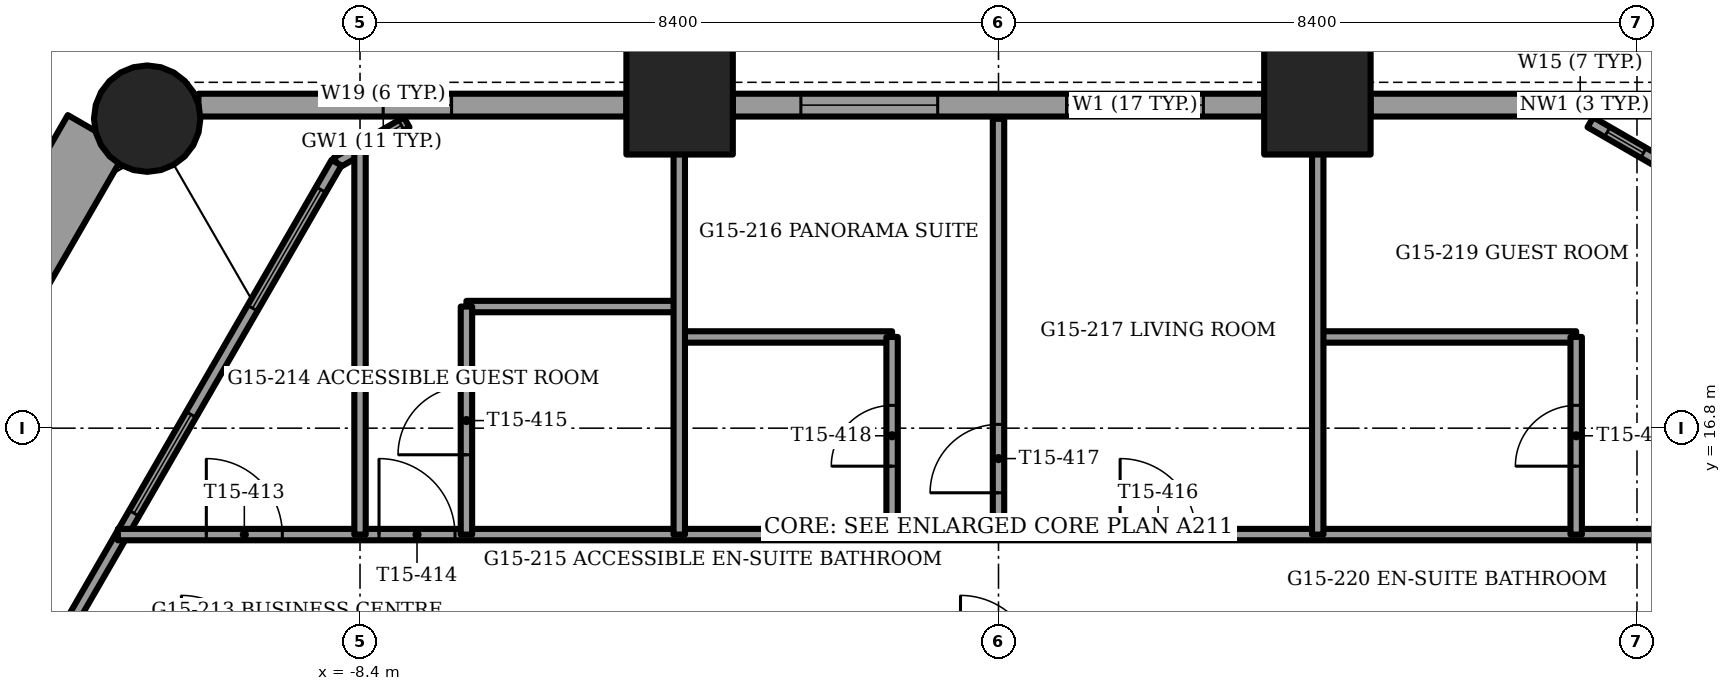
"""IFC4 building model, lengths in metres.
Left out: names, types, materials, properties, quantities, classifications, styles, units other than length and angle.
Written with IfcOpenShell. Run it as: python <this file> out.ifc"""

import sys

from ifc_helpers import new_model, si_unit, direction, frame, frame_2d, origin, origin_2d, place, context, subcontext, project, spatial, rectangle, circle, extrude, element, fill, save


model = new_model("IFC4")
c1 = context("Model", 3, precision=1e-05, world=origin(), true_north=direction((0.0, 1.0)))
c2 = subcontext(c1, "Body", "Model", "MODEL_VIEW")
j1 = project(units=[si_unit("LENGTHUNIT", "METRE"), si_unit("PLANEANGLEUNIT", "RADIAN")], contexts=[c1])
p1 = place(None, origin())
s1 = spatial("IfcSite", under=j1, at=p1, CompositionType="ELEMENT")
p2 = place(p1, origin())
s2 = spatial("IfcBuilding", under=s1, at=p2, CompositionType="ELEMENT")
p3 = place(p2, frame((0.0, 0.0, 61.75)))
s3 = spatial("IfcBuildingStorey", under=s2, at=p3, CompositionType="ELEMENT", Elevation=61.75)
p4 = place(p3, frame((-11.2, 20.872, -1.2), z_axis=(0.0, 0.0, 1.0), x_axis=(1.0, 0.0, 0.0)))
e1 = element("IfcColumn", 1, at=p4, inside=s3, PredefinedType="COLUMN", context=c2, shape_type="SweptSolid", body=[
    extrude(circle(Radius=0.7, at=origin_2d()), origin(), (0.0, 0.0, 1.0), 3.75),
])
for number, where, z_axis, x_axis in (
    (2, (4.195, 21.1, -1.2), (0.0, 0.0, 1.0), (1.0, 0.0, 0.0)),
    (3, (-4.195, 21.1, -1.2), (0.0, 0.0, 1.0), (1.0, 0.0, 0.0)),
):
    element("IfcColumn", number, at=place(p3, frame(where, z_axis=z_axis, x_axis=x_axis)), inside=s3, PredefinedType="COLUMN", context=c2, shape_type="SweptSolid", body=[
        extrude(rectangle(XDim=1.4, YDim=1.4, at=origin_2d()), origin(), (0.0, 0.0, 1.0), 3.75),
    ])
p5 = place(p3, frame((-11.855, 20.694, 0.0), z_axis=(0.0, 0.0, 1.0), x_axis=(-0.500013966327, -0.866017340172, 0.0)))
e4 = element("IfcWall", 4, at=p5, inside=s3, PredefinedType="PARAPET", context=c2, shape_type="SweptSolid", body=[
    extrude(rectangle(XDim=7.129, YDim=0.9, at=frame_2d((3.564, 0.0))), origin(), (0.0, 0.0, 1.0), 1.1),
])
p6 = place(p3, frame((10.526, 21.05, 0.0), z_axis=(0.0, 0.0, 1.0), x_axis=(-1.0, 0.0, 0.0)))
e5 = element("IfcWall", 5, at=p6, inside=s3, PredefinedType="SOLIDWALL", context=c2, shape_type="SweptSolid", body=[
    extrude(rectangle(XDim=5.631, YDim=0.3, at=frame_2d((2.815, 0.0))), origin(), (0.0, 0.0, 1.0), 2.55),
])
p7 = place(p6, frame((2.423, 0.0, 0.15)))
e6 = element("IfcOpeningElement", 6, at=p7, cuts=e5, PredefinedType="OPENING", context=c2, shape_type="SweptSolid", body=[
    extrude(rectangle(XDim=0.9, YDim=2.15, at=frame_2d((0.45, 1.075))), frame((0.0, 0.15, 0.0), z_axis=(0.0, -1.0, 0.0), x_axis=(1.0, 0.0, 0.0)), (0.0, 0.0, 1.0), 0.3),
])
p8 = place(p3, frame((3.495, 21.05, 0.0), z_axis=(0.0, 0.0, 1.0), x_axis=(-1.0, 0.0, 0.0)))
e7 = element("IfcWall", 7, at=p8, inside=s3, PredefinedType="SOLIDWALL", context=c2, shape_type="SweptSolid", body=[
    extrude(rectangle(XDim=6.991, YDim=0.3, at=frame_2d((3.495, 0.0))), origin(), (0.0, 0.0, 1.0), 2.55),
])
p9 = place(p8, frame((0.8, 0.0, 0.15)))
e8 = element("IfcOpeningElement", 8, at=p9, cuts=e7, PredefinedType="OPENING", context=c2, shape_type="SweptSolid", body=[
    extrude(rectangle(XDim=1.8, YDim=2.15, at=frame_2d((0.9, 1.075))), frame((0.0, 0.15, 0.0), z_axis=(0.0, -1.0, 0.0), x_axis=(1.0, 0.0, 0.0)), (0.0, 0.0, 1.0), 0.3),
])
p10 = place(p8, frame((4.295, 0.0, 0.15)))
e9 = element("IfcOpeningElement", 9, at=p10, cuts=e7, PredefinedType="OPENING", context=c2, shape_type="SweptSolid", body=[
    extrude(rectangle(XDim=1.8, YDim=2.15, at=frame_2d((0.9, 1.075))), frame((0.0, 0.15, 0.0), z_axis=(0.0, -1.0, 0.0), x_axis=(1.0, 0.0, 0.0)), (0.0, 0.0, 1.0), 0.3),
])
p11 = place(p3, frame((-4.896, 21.05, 0.0), z_axis=(0.0, 0.0, 1.0), x_axis=(-1.0, 0.0, 0.0)))
e10 = element("IfcWall", 10, at=p11, inside=s3, PredefinedType="SOLIDWALL", context=c2, shape_type="SweptSolid", body=[
    extrude(rectangle(XDim=5.631, YDim=0.3, at=frame_2d((2.815, 0.0))), origin(), (0.0, 0.0, 1.0), 2.55),
])
p12 = place(p11, frame((2.3, 0.0, 0.15)))
e11 = element("IfcOpeningElement", 11, at=p12, cuts=e10, PredefinedType="OPENING", context=c2, shape_type="SweptSolid", body=[
    extrude(rectangle(XDim=0.9, YDim=2.15, at=frame_2d((0.45, 1.075))), frame((0.0, 0.15, 0.0), z_axis=(0.0, -1.0, 0.0), x_axis=(1.0, 0.0, 0.0)), (0.0, 0.0, 1.0), 0.3),
])
p13 = place(p3, frame((-8.709, 20.292, 0.0), z_axis=(0.0, 0.0, 1.0), x_axis=(-0.500005515081, -0.866022219628, 0.0)))
e12 = element("IfcWall", 12, at=p13, inside=s3, PredefinedType="SOLIDWALL", context=c2, shape_type="SweptSolid", body=[
    extrude(rectangle(XDim=23.667, YDim=0.15, at=frame_2d((11.833, 0.0))), origin(), (0.0, 0.0, 1.0), 3.45),
])
p14 = place(p13, frame((3.825, 0.0, 0.15)))
e13 = element("IfcOpeningElement", 13, at=p14, cuts=e12, PredefinedType="OPENING", context=c2, shape_type="SweptSolid", body=[
    extrude(rectangle(XDim=1.5, YDim=2.85, at=frame_2d((0.75, 1.425))), frame((0.0, 0.075, 0.0), z_axis=(0.0, -1.0, 0.0), x_axis=(1.0, 0.0, 0.0)), (0.0, 0.0, 1.0), 0.15),
])
p15 = place(p13, frame((7.219, 0.0, 0.15)))
e14 = element("IfcOpeningElement", 14, at=p15, cuts=e12, PredefinedType="OPENING", context=c2, shape_type="SweptSolid", body=[
    extrude(rectangle(XDim=0.9, YDim=2.85, at=frame_2d((0.45, 1.425))), frame((0.0, 0.075, 0.0), z_axis=(0.0, -1.0, 0.0), x_axis=(1.0, 0.0, 0.0)), (0.0, 0.0, 1.0), 0.15),
])
p16 = place(p13, frame((8.254, 0.0, 0.15)))
e15 = element("IfcOpeningElement", 15, at=p16, cuts=e12, PredefinedType="OPENING", context=c2, shape_type="SweptSolid", body=[
    extrude(rectangle(XDim=1.5, YDim=2.85, at=frame_2d((0.75, 1.425))), frame((0.0, 0.075, 0.0), z_axis=(0.0, -1.0, 0.0), x_axis=(1.0, 0.0, 0.0)), (0.0, 0.0, 1.0), 0.15),
])
p17 = place(p13, frame((11.419, 0.0, 0.15)))
e16 = element("IfcOpeningElement", 16, at=p17, cuts=e12, PredefinedType="OPENING", context=c2, shape_type="SweptSolid", body=[
    extrude(rectangle(XDim=1.8, YDim=2.85, at=frame_2d((0.9, 1.425))), frame((0.0, 0.075, 0.0), z_axis=(0.0, -1.0, 0.0), x_axis=(1.0, 0.0, 0.0)), (0.0, 0.0, 1.0), 0.15),
])
p18 = place(p13, frame((13.519, 0.0, 0.15)))
e17 = element("IfcOpeningElement", 17, at=p18, cuts=e12, PredefinedType="OPENING", context=c2, shape_type="SweptSolid", body=[
    extrude(rectangle(XDim=1.5, YDim=2.85, at=frame_2d((0.75, 1.425))), frame((0.0, 0.075, 0.0), z_axis=(0.0, -1.0, 0.0), x_axis=(1.0, 0.0, 0.0)), (0.0, 0.0, 1.0), 0.15),
])
p19 = place(p13, frame((15.63, 0.0, 0.0)))
e18 = element("IfcOpeningElement", 18, at=p19, cuts=e12, PredefinedType="OPENING", context=c2, shape_type="SweptSolid", body=[
    extrude(rectangle(XDim=1.5, YDim=2.4, at=frame_2d((0.75, 1.2))), frame((0.0, 0.075, 0.0), z_axis=(0.0, -1.0, 0.0), x_axis=(1.0, 0.0, 0.0)), (0.0, 0.0, 1.0), 0.15),
])
p20 = place(p13, frame((0.41, 0.0, 0.15)))
e19 = element("IfcOpeningElement", 19, at=p20, cuts=e12, PredefinedType="OPENING", context=c2, shape_type="SweptSolid", body=[
    extrude(rectangle(XDim=1.8, YDim=2.73, at=frame_2d((0.9, 1.365))), frame((0.0, 0.075, 0.0), z_axis=(0.0, -1.0, 0.0), x_axis=(1.0, 0.0, 0.0)), (0.0, 0.0, 1.0), 0.15),
])
p21 = place(p13, frame((20.743, 0.0, 0.15)))
e20 = element("IfcOpeningElement", 20, at=p21, cuts=e12, PredefinedType="OPENING", context=c2, shape_type="SweptSolid", body=[
    extrude(rectangle(XDim=1.8, YDim=2.73, at=frame_2d((0.9, 1.365))), frame((0.0, 0.075, 0.0), z_axis=(0.0, -1.0, 0.0), x_axis=(1.0, 0.0, 0.0)), (0.0, 0.0, 1.0), 0.15),
])
p22 = place(p3, frame((-7.787, 20.825, 0.0), z_axis=(0.0, 0.0, 1.0), x_axis=(-0.865990848561, -0.500059846627, 0.0)))
e21 = element("IfcWall", 21, at=p22, inside=s3, PredefinedType="SOLIDWALL", context=c2, shape_type="SweptSolid", body=[
    extrude(rectangle(XDim=1.065, YDim=0.15, at=frame_2d((0.532, 0.0))), origin(), (0.0, 0.0, 1.0), 3.45),
])
p23 = place(p22, frame((0.08, 0.0, 0.15)))
e22 = element("IfcOpeningElement", 22, at=p23, cuts=e21, PredefinedType="OPENING", context=c2, shape_type="SweptSolid", body=[
    extrude(rectangle(XDim=0.55, YDim=2.85, at=frame_2d((0.275, 1.425))), frame((0.0, 0.075, 0.0), z_axis=(0.0, -1.0, 0.0), x_axis=(1.0, 0.0, 0.0)), (0.0, 0.0, 1.0), 0.15),
])
p24 = place(p3, frame((8.709, 20.292, 0.0), z_axis=(0.0, 0.0, 1.0), x_axis=(-0.865990848561, 0.500059846627, 0.0)))
e23 = element("IfcWall", 23, at=p24, inside=s3, PredefinedType="SOLIDWALL", context=c2, shape_type="SweptSolid", body=[
    extrude(rectangle(XDim=1.065, YDim=0.15, at=frame_2d((0.532, 0.0))), origin(), (0.0, 0.0, 1.0), 3.45),
])
p25 = place(p24, frame((0.258, 0.0, 0.15)))
e24 = element("IfcOpeningElement", 24, at=p25, cuts=e23, PredefinedType="OPENING", context=c2, shape_type="SweptSolid", body=[
    extrude(rectangle(XDim=0.55, YDim=2.85, at=frame_2d((0.275, 1.425))), frame((0.0, 0.075, 0.0), z_axis=(0.0, -1.0, 0.0), x_axis=(1.0, 0.0, 0.0)), (0.0, 0.0, 1.0), 0.15),
])
p26 = place(p3, frame((-11.586, 15.4, 0.0), z_axis=(0.0, 0.0, 1.0), x_axis=(1.0, 0.0, 0.0)))
e25 = element("IfcWall", 25, at=p26, inside=s3, PredefinedType="PARTITIONING", context=c2, shape_type="SweptSolid", body=[
    extrude(rectangle(XDim=23.172, YDim=0.15, at=frame_2d((11.586, 0.0))), origin(), (0.0, 0.0, 1.0), 3.45),
])
p27 = place(p26, frame((1.164, 0.0, 0.0)))
e26 = element("IfcOpeningElement", 26, at=p27, cuts=e25, PredefinedType="OPENING", context=c2, shape_type="SweptSolid", body=[
    extrude(rectangle(XDim=1.0, YDim=2.1, at=frame_2d((0.5, 1.05))), frame((0.0, 0.075, 0.0), z_axis=(0.0, -1.0, 0.0), x_axis=(1.0, 0.0, 0.0)), (0.0, 0.0, 1.0), 0.15),
])
p28 = place(p26, frame((3.436, 0.0, 0.0)))
e27 = element("IfcOpeningElement", 27, at=p28, cuts=e25, PredefinedType="OPENING", context=c2, shape_type="SweptSolid", body=[
    extrude(rectangle(XDim=1.0, YDim=2.1, at=frame_2d((0.5, 1.05))), frame((0.0, 0.075, 0.0), z_axis=(0.0, -1.0, 0.0), x_axis=(1.0, 0.0, 0.0)), (0.0, 0.0, 1.0), 0.15),
])
p29 = place(p26, frame((13.186, 0.0, 0.0)))
e28 = element("IfcOpeningElement", 28, at=p29, cuts=e25, PredefinedType="OPENING", context=c2, shape_type="SweptSolid", body=[
    extrude(rectangle(XDim=1.0, YDim=2.1, at=frame_2d((0.5, 1.05))), frame((0.0, 0.075, 0.0), z_axis=(0.0, -1.0, 0.0), x_axis=(1.0, 0.0, 0.0)), (0.0, 0.0, 1.0), 0.15),
])
p30 = place(p26, frame((21.781, 0.0, 0.0)))
e29 = element("IfcOpeningElement", 29, at=p30, cuts=e25, PredefinedType="OPENING", context=c2, shape_type="SweptSolid", body=[
    extrude(rectangle(XDim=1.0, YDim=2.1, at=frame_2d((0.5, 1.05))), frame((0.0, 0.075, 0.0), z_axis=(0.0, -1.0, 0.0), x_axis=(1.0, 0.0, 0.0)), (0.0, 0.0, 1.0), 0.15),
])
p31 = place(p3, frame((-4.2, 18.0, 0.0), z_axis=(0.0, 0.0, 1.0), x_axis=(1.0, 0.0, 0.0)))
e30 = element("IfcWall", 30, at=p31, inside=s3, PredefinedType="PARTITIONING", context=c2, shape_type="SweptSolid", body=[
    extrude(rectangle(XDim=2.8, YDim=0.15, at=frame_2d((1.4, 0.0))), origin(), (0.0, 0.0, 1.0), 3.45),
])
p32 = place(p3, frame((4.2, 18.0, 0.0), z_axis=(0.0, 0.0, 1.0), x_axis=(1.0, 0.0, 0.0)))
e31 = element("IfcWall", 31, at=p32, inside=s3, PredefinedType="PARTITIONING", context=c2, shape_type="SweptSolid", body=[
    extrude(rectangle(XDim=3.4, YDim=0.15, at=frame_2d((1.7, 0.0))), origin(), (0.0, 0.0, 1.0), 3.45),
])
p33 = place(p3, frame((-7.0, 18.4, 0.0), z_axis=(0.0, 0.0, 1.0), x_axis=(1.0, 0.0, 0.0)))
e32 = element("IfcWall", 32, at=p33, inside=s3, PredefinedType="PARTITIONING", context=c2, shape_type="SweptSolid", body=[
    extrude(rectangle(XDim=2.8, YDim=0.15, at=frame_2d((1.4, 0.0))), origin(), (0.0, 0.0, 1.0), 3.45),
])
p34 = place(p3, frame((7.6, 15.4, 0.0), z_axis=(0.0, 0.0, 1.0), x_axis=(0.0, 1.0, 0.0)))
e33 = element("IfcWall", 33, at=p34, inside=s3, PredefinedType="PARTITIONING", context=c2, shape_type="SweptSolid", body=[
    extrude(rectangle(XDim=2.6, YDim=0.15, at=frame_2d((1.3, 0.0))), origin(), (0.0, 0.0, 1.0), 3.45),
])
p35 = place(p34, frame((0.9, 0.0, 0.0)))
e34 = element("IfcOpeningElement", 34, at=p35, cuts=e33, PredefinedType="OPENING", context=c2, shape_type="SweptSolid", body=[
    extrude(rectangle(XDim=0.8, YDim=2.1, at=frame_2d((0.4, 1.05))), frame((0.0, 0.075, 0.0), z_axis=(0.0, -1.0, 0.0), x_axis=(1.0, 0.0, 0.0)), (0.0, 0.0, 1.0), 0.15),
])
p36 = place(p3, frame((4.2, 15.4, 0.0), z_axis=(0.0, 0.0, 1.0), x_axis=(0.0, 1.0, 0.0)))
e35 = element("IfcWall", 35, at=p36, inside=s3, PredefinedType="PARTITIONING", context=c2, shape_type="SweptSolid", body=[
    extrude(rectangle(XDim=5.47, YDim=0.15, at=frame_2d((2.735, 0.0))), origin(), (0.0, 0.0, 1.0), 3.45),
])
p37 = place(p3, frame((0.0, 15.4, 0.0), z_axis=(0.0, 0.0, 1.0), x_axis=(0.0, 1.0, 0.0)))
e36 = element("IfcWall", 36, at=p37, inside=s3, PredefinedType="PARTITIONING", context=c2, shape_type="SweptSolid", body=[
    extrude(rectangle(XDim=5.47, YDim=0.15, at=frame_2d((2.735, 0.0))), origin(), (0.0, 0.0, 1.0), 3.45),
])
p38 = place(p37, frame((0.55, 0.0, 0.0)))
e37 = element("IfcOpeningElement", 37, at=p38, cuts=e36, PredefinedType="OPENING", context=c2, shape_type="SweptSolid", body=[
    extrude(rectangle(XDim=0.9, YDim=2.1, at=frame_2d((0.45, 1.05))), frame((0.0, 0.075, 0.0), z_axis=(0.0, -1.0, 0.0), x_axis=(1.0, 0.0, 0.0)), (0.0, 0.0, 1.0), 0.15),
])
p39 = place(p3, frame((-1.4, 15.4, 0.0), z_axis=(0.0, 0.0, 1.0), x_axis=(0.0, 1.0, 0.0)))
e38 = element("IfcWall", 38, at=p39, inside=s3, PredefinedType="PARTITIONING", context=c2, shape_type="SweptSolid", body=[
    extrude(rectangle(XDim=2.6, YDim=0.15, at=frame_2d((1.3, 0.0))), origin(), (0.0, 0.0, 1.0), 3.45),
])
p40 = place(p39, frame((0.9, 0.0, 0.0)))
e39 = element("IfcOpeningElement", 39, at=p40, cuts=e38, PredefinedType="OPENING", context=c2, shape_type="SweptSolid", body=[
    extrude(rectangle(XDim=0.8, YDim=2.1, at=frame_2d((0.4, 1.05))), frame((0.0, 0.075, 0.0), z_axis=(0.0, -1.0, 0.0), x_axis=(1.0, 0.0, 0.0)), (0.0, 0.0, 1.0), 0.15),
])
p41 = place(p3, frame((-4.2, 15.4, 0.0), z_axis=(0.0, 0.0, 1.0), x_axis=(0.0, 1.0, 0.0)))
e40 = element("IfcWall", 40, at=p41, inside=s3, PredefinedType="PARTITIONING", context=c2, shape_type="SweptSolid", body=[
    extrude(rectangle(XDim=5.47, YDim=0.15, at=frame_2d((2.735, 0.0))), origin(), (0.0, 0.0, 1.0), 3.45),
])
p42 = place(p3, frame((-7.0, 15.4, 0.0), z_axis=(0.0, 0.0, 1.0), x_axis=(0.0, 1.0, 0.0)))
e41 = element("IfcWall", 41, at=p42, inside=s3, PredefinedType="PARTITIONING", context=c2, shape_type="SweptSolid", body=[
    extrude(rectangle(XDim=3.0, YDim=0.15, at=frame_2d((1.5, 0.0))), origin(), (0.0, 0.0, 1.0), 3.45),
])
p43 = place(p42, frame((1.05, 0.0, 0.0)))
e42 = element("IfcOpeningElement", 42, at=p43, cuts=e41, PredefinedType="OPENING", context=c2, shape_type="SweptSolid", body=[
    extrude(rectangle(XDim=0.9, YDim=2.1, at=frame_2d((0.45, 1.05))), frame((0.0, 0.075, 0.0), z_axis=(0.0, -1.0, 0.0), x_axis=(1.0, 0.0, 0.0)), (0.0, 0.0, 1.0), 0.15),
])
p44 = place(p3, frame((-8.4, 15.4, 0.0), z_axis=(0.0, 0.0, 1.0), x_axis=(0.0, 1.0, 0.0)))
e43 = element("IfcWall", 43, at=p44, inside=s3, PredefinedType="PARTITIONING", context=c2, shape_type="SweptSolid", body=[
    extrude(rectangle(XDim=5.091, YDim=0.15, at=frame_2d((2.545, 0.0))), origin(), (0.0, 0.0, 1.0), 3.45),
])
p45 = place(p7, origin())
e44 = element("IfcWindow", 44, at=p45, inside=s3, PartitioningType="SINGLE_PANEL", PredefinedType="WINDOW", context=c2, shape_type="SweptSolid", body=[
    extrude(rectangle(XDim=0.9, YDim=2.15, at=frame_2d((0.45, 1.075))), frame((0.0, 0.03, 0.0), z_axis=(0.0, -1.0, 0.0), x_axis=(1.0, 0.0, 0.0)), (0.0, 0.0, 1.0), 0.06),
])
fill(e6, e44)
p46 = place(p9, origin())
e45 = element("IfcWindow", 45, at=p46, inside=s3, PartitioningType="SINGLE_PANEL", PredefinedType="WINDOW", context=c2, shape_type="SweptSolid", body=[
    extrude(rectangle(XDim=1.8, YDim=2.15, at=frame_2d((0.9, 1.075))), frame((0.0, 0.03, 0.0), z_axis=(0.0, -1.0, 0.0), x_axis=(1.0, 0.0, 0.0)), (0.0, 0.0, 1.0), 0.06),
])
fill(e8, e45)
p47 = place(p10, origin())
e46 = element("IfcWindow", 46, at=p47, inside=s3, PartitioningType="SINGLE_PANEL", PredefinedType="WINDOW", context=c2, shape_type="SweptSolid", body=[
    extrude(rectangle(XDim=1.8, YDim=2.15, at=frame_2d((0.9, 1.075))), frame((0.0, 0.03, 0.0), z_axis=(0.0, -1.0, 0.0), x_axis=(1.0, 0.0, 0.0)), (0.0, 0.0, 1.0), 0.06),
])
fill(e9, e46)
p48 = place(p12, origin())
e47 = element("IfcWindow", 47, at=p48, inside=s3, PartitioningType="SINGLE_PANEL", PredefinedType="WINDOW", context=c2, shape_type="SweptSolid", body=[
    extrude(rectangle(XDim=0.9, YDim=2.15, at=frame_2d((0.45, 1.075))), frame((0.0, 0.03, 0.0), z_axis=(0.0, -1.0, 0.0), x_axis=(1.0, 0.0, 0.0)), (0.0, 0.0, 1.0), 0.06),
])
fill(e11, e47)
p49 = place(p14, origin())
e48 = element("IfcWindow", 48, at=p49, inside=s3, PartitioningType="SINGLE_PANEL", PredefinedType="WINDOW", context=c2, shape_type="SweptSolid", body=[
    extrude(rectangle(XDim=1.5, YDim=2.85, at=frame_2d((0.75, 1.425))), frame((0.0, 0.03, 0.0), z_axis=(0.0, -1.0, 0.0), x_axis=(1.0, 0.0, 0.0)), (0.0, 0.0, 1.0), 0.06),
])
fill(e13, e48)
p50 = place(p20, origin())
e49 = element("IfcWindow", 49, at=p50, inside=s3, PartitioningType="SINGLE_PANEL", PredefinedType="WINDOW", context=c2, shape_type="SweptSolid", body=[
    extrude(rectangle(XDim=1.8, YDim=2.73, at=frame_2d((0.9, 1.365))), frame((0.0, 0.03, 0.0), z_axis=(0.0, -1.0, 0.0), x_axis=(1.0, 0.0, 0.0)), (0.0, 0.0, 1.0), 0.06),
])
fill(e19, e49)
p51 = place(p23, origin())
e50 = element("IfcWindow", 50, at=p51, inside=s3, PartitioningType="SINGLE_PANEL", PredefinedType="WINDOW", context=c2, shape_type="SweptSolid", body=[
    extrude(rectangle(XDim=0.55, YDim=2.85, at=frame_2d((0.275, 1.425))), frame((0.0, 0.03, 0.0), z_axis=(0.0, -1.0, 0.0), x_axis=(1.0, 0.0, 0.0)), (0.0, 0.0, 1.0), 0.06),
])
fill(e22, e50)
p52 = place(p25, origin())
e51 = element("IfcWindow", 51, at=p52, inside=s3, PartitioningType="SINGLE_PANEL", PredefinedType="WINDOW", context=c2, shape_type="SweptSolid", body=[
    extrude(rectangle(XDim=0.55, YDim=2.85, at=frame_2d((0.275, 1.425))), frame((0.0, 0.03, 0.0), z_axis=(0.0, -1.0, 0.0), x_axis=(1.0, 0.0, 0.0)), (0.0, 0.0, 1.0), 0.06),
])
fill(e24, e51)
p53 = place(p27, origin())
e52 = element("IfcDoor", 52, at=p53, inside=s3, OperationType="SINGLE_SWING_LEFT", PredefinedType="DOOR", context=c2, shape_type="SweptSolid", body=[
    extrude(rectangle(XDim=1.0, YDim=2.1, at=frame_2d((0.5, 1.05))), frame((0.0, 0.025, 0.0), z_axis=(0.0, -1.0, 0.0), x_axis=(1.0, 0.0, 0.0)), (0.0, 0.0, 1.0), 0.05),
])
fill(e26, e52)
p54 = place(p28, origin())
e53 = element("IfcDoor", 53, at=p54, inside=s3, OperationType="SINGLE_SWING_LEFT", PredefinedType="DOOR", context=c2, shape_type="SweptSolid", body=[
    extrude(rectangle(XDim=1.0, YDim=2.1, at=frame_2d((0.5, 1.05))), frame((0.0, 0.025, 0.0), z_axis=(0.0, -1.0, 0.0), x_axis=(1.0, 0.0, 0.0)), (0.0, 0.0, 1.0), 0.05),
])
fill(e27, e53)
p55 = place(p43, origin())
e54 = element("IfcDoor", 54, at=p55, inside=s3, OperationType="SINGLE_SWING_LEFT", PredefinedType="DOOR", context=c2, shape_type="SweptSolid", body=[
    extrude(rectangle(XDim=0.9, YDim=2.1, at=frame_2d((0.45, 1.05))), frame((0.0, 0.025, 0.0), z_axis=(0.0, -1.0, 0.0), x_axis=(1.0, 0.0, 0.0)), (0.0, 0.0, 1.0), 0.05),
])
fill(e42, e54)
p56 = place(p29, origin())
e55 = element("IfcDoor", 55, at=p56, inside=s3, OperationType="SINGLE_SWING_RIGHT", PredefinedType="DOOR", context=c2, shape_type="SweptSolid", body=[
    extrude(rectangle(XDim=1.0, YDim=2.1, at=frame_2d((0.5, 1.05))), frame((0.0, 0.025, 0.0), z_axis=(0.0, -1.0, 0.0), x_axis=(1.0, 0.0, 0.0)), (0.0, 0.0, 1.0), 0.05),
])
fill(e28, e55)
p57 = place(p38, origin())
e56 = element("IfcDoor", 56, at=p57, inside=s3, OperationType="SINGLE_SWING_LEFT", PredefinedType="DOOR", context=c2, shape_type="SweptSolid", body=[
    extrude(rectangle(XDim=0.9, YDim=2.1, at=frame_2d((0.45, 1.05))), frame((0.0, 0.025, 0.0), z_axis=(0.0, -1.0, 0.0), x_axis=(1.0, 0.0, 0.0)), (0.0, 0.0, 1.0), 0.05),
])
fill(e37, e56)
p58 = place(p40, origin())
e57 = element("IfcDoor", 57, at=p58, inside=s3, OperationType="SINGLE_SWING_LEFT", PredefinedType="DOOR", context=c2, shape_type="SweptSolid", body=[
    extrude(rectangle(XDim=0.8, YDim=2.1, at=frame_2d((0.4, 1.05))), frame((0.0, 0.025, 0.0), z_axis=(0.0, -1.0, 0.0), x_axis=(1.0, 0.0, 0.0)), (0.0, 0.0, 1.0), 0.05),
])
fill(e39, e57)
p59 = place(p35, origin())
e58 = element("IfcDoor", 58, at=p59, inside=s3, OperationType="SINGLE_SWING_LEFT", PredefinedType="DOOR", context=c2, shape_type="SweptSolid", body=[
    extrude(rectangle(XDim=0.8, YDim=2.1, at=frame_2d((0.4, 1.05))), frame((0.0, 0.025, 0.0), z_axis=(0.0, -1.0, 0.0), x_axis=(1.0, 0.0, 0.0)), (0.0, 0.0, 1.0), 0.05),
])
fill(e34, e58)
save(model, sys.argv[1])
